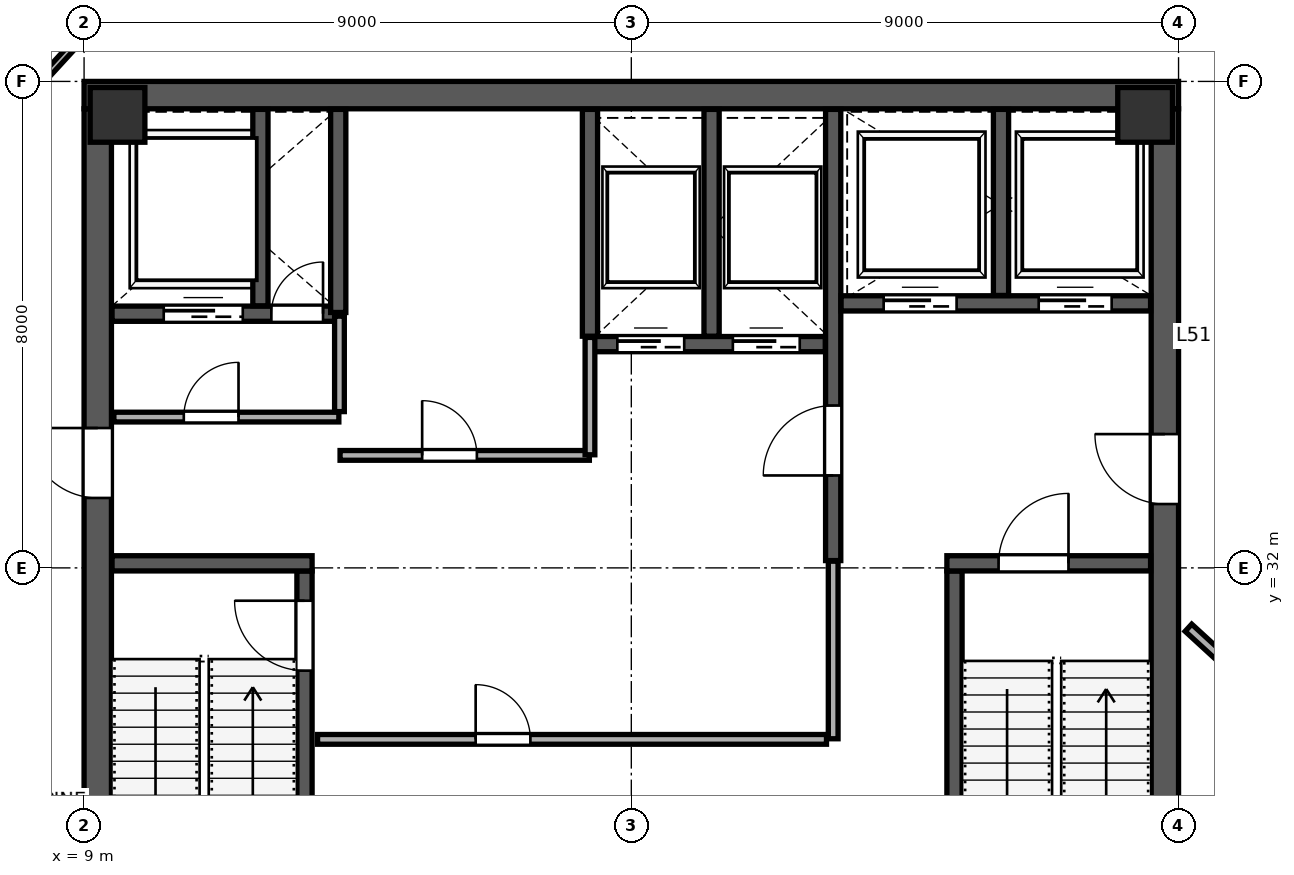
"""IFC4 building model, lengths in metres.
Left out: names, types, materials, properties, quantities, classifications, styles, units other than length and angle.
Written with IfcOpenShell. Run it as: python <this file> out.ifc"""

import sys

from ifc_helpers import new_model, si_unit, direction, frame, frame_2d, origin, origin_2d, place, context, subcontext, project, spatial, rectangle, extrude, source, transform, mapped, element, fill, save


model = new_model("IFC4")
c1 = context("Model", 3, precision=1e-05, world=origin(), true_north=direction((0.0, 1.0)))
c2 = subcontext(c1, "Body", "Model", "MODEL_VIEW")
j1 = project(units=[si_unit("LENGTHUNIT", "METRE"), si_unit("PLANEANGLEUNIT", "RADIAN")], contexts=[c1])
p1 = place(None, origin())
s1 = spatial("IfcSite", under=j1, at=p1, CompositionType="ELEMENT")
p2 = place(p1, origin())
s2 = spatial("IfcBuilding", under=s1, at=p2, CompositionType="ELEMENT")
p3 = place(p2, frame((0.0, 0.0, 229.0)))
s3 = spatial("IfcBuildingStorey", under=s2, at=p3, CompositionType="ELEMENT", Elevation=229.0)
m1 = source(origin(), c2, "Body", "SweptSolid", [
    extrude(rectangle(XDim=0.9, YDim=0.9, at=origin_2d()), origin(), (0.0, 0.0, 1.0), 4.198),
])
for number, where, z_axis, x_axis in (
    (1, (9.55, 39.45, 0.001), (0.0, 0.0, 1.0), (1.0, 0.0, 0.0)),
    (2, (26.45, 39.45, 0.001), (0.0, 0.0, 1.0), (1.0, 0.0, 0.0)),
):
    element("IfcColumn", number, at=place(p3, frame(where, z_axis=z_axis, x_axis=x_axis)), inside=s3, PredefinedType="COLUMN", context=c2, shape_type="MappedRepresentation", body=[
        mapped(m1, transform((0.0, 0.0, 0.0), scale=1.0)),
    ])
p4 = place(p3, frame((9.225, 24.45, 0.0), z_axis=(0.0, 0.0, 1.0), x_axis=(0.0, 1.0, 0.0)))
e3 = element("IfcWall", 3, at=p4, inside=s3, PredefinedType="SHEAR", context=c2, shape_type="SweptSolid", body=[
    extrude(rectangle(XDim=15.1, YDim=0.45, at=frame_2d((7.55, 0.0))), origin(), (0.0, 0.0, 1.0), 3.96),
])
p5 = place(p4, frame((8.7, 0.0, 0.0)))
e4 = element("IfcOpeningElement", 4, at=p5, cuts=e3, PredefinedType="OPENING", context=c2, shape_type="SweptSolid", body=[
    extrude(rectangle(XDim=1.15, YDim=2.2, at=frame_2d((0.575, 1.1))), frame((0.0, 0.235, 0.0), z_axis=(0.0, -1.0, 0.0), x_axis=(1.0, 0.0, 0.0)), (0.0, 0.0, 1.0), 0.47),
])
p6 = place(p3, frame((26.775, 24.45, 0.0), z_axis=(0.0, 0.0, 1.0), x_axis=(0.0, 1.0, 0.0)))
e5 = element("IfcWall", 5, at=p6, inside=s3, PredefinedType="SHEAR", context=c2, shape_type="SweptSolid", body=[
    extrude(rectangle(XDim=15.1, YDim=0.45, at=frame_2d((7.55, 0.0))), origin(), (0.0, 0.0, 1.0), 3.96),
])
p7 = place(p6, frame((8.6, 0.0, 0.0)))
e6 = element("IfcOpeningElement", 6, at=p7, cuts=e5, PredefinedType="OPENING", context=c2, shape_type="SweptSolid", body=[
    extrude(rectangle(XDim=1.15, YDim=2.2, at=frame_2d((0.575, 1.1))), frame((0.0, 0.235, 0.0), z_axis=(0.0, -1.0, 0.0), x_axis=(1.0, 0.0, 0.0)), (0.0, 0.0, 1.0), 0.47),
])
p8 = place(p3, frame((9.0, 39.775, 0.0), z_axis=(0.0, 0.0, 1.0), x_axis=(1.0, 0.0, 0.0)))
e7 = element("IfcWall", 7, at=p8, inside=s3, PredefinedType="SHEAR", context=c2, shape_type="SweptSolid", body=[
    extrude(rectangle(XDim=18.0, YDim=0.45, at=frame_2d((9.0, 0.0))), origin(), (0.0, 0.0, 1.0), 3.96),
])
p9 = place(p3, frame((12.625, 24.46, 0.0), z_axis=(0.0, 0.0, 1.0), x_axis=(0.0, 1.0, 0.0)))
e8 = element("IfcWall", 8, at=p9, inside=s3, PredefinedType="SHEAR", context=c2, shape_type="SweptSolid", body=[
    extrude(rectangle(XDim=7.49, YDim=0.25, at=frame_2d((3.745, 0.0))), origin(), (0.0, 0.0, 1.0), 3.96),
])
p10 = place(p9, frame((5.85, 0.0, 0.0)))
e9 = element("IfcOpeningElement", 9, at=p10, cuts=e8, PredefinedType="OPENING", context=c2, shape_type="SweptSolid", body=[
    extrude(rectangle(XDim=1.15, YDim=2.2, at=frame_2d((0.575, 1.1))), frame((0.0, 0.135, 0.0), z_axis=(0.0, -1.0, 0.0), x_axis=(1.0, 0.0, 0.0)), (0.0, 0.0, 1.0), 0.27),
])
p11 = place(p3, frame((9.46, 32.075, 0.0), z_axis=(0.0, 0.0, 1.0), x_axis=(1.0, 0.0, 0.0)))
e10 = element("IfcWall", 10, at=p11, inside=s3, PredefinedType="SHEAR", context=c2, shape_type="SweptSolid", body=[
    extrude(rectangle(XDim=3.29, YDim=0.25, at=frame_2d((1.645, 0.0))), origin(), (0.0, 0.0, 1.0), 3.96),
])
p12 = place(p3, frame((23.315, 24.46, 0.0), z_axis=(0.0, 0.0, 1.0), x_axis=(0.0, 1.0, 0.0)))
e11 = element("IfcWall", 11, at=p12, inside=s3, PredefinedType="SHEAR", context=c2, shape_type="SweptSolid", body=[
    extrude(rectangle(XDim=7.49, YDim=0.25, at=frame_2d((3.745, 0.0))), origin(), (0.0, 0.0, 1.0), 3.96),
])
p13 = place(p3, frame((23.19, 32.075, 0.0), z_axis=(0.0, 0.0, 1.0), x_axis=(1.0, 0.0, 0.0)))
e12 = element("IfcWall", 12, at=p13, inside=s3, PredefinedType="SHEAR", context=c2, shape_type="SweptSolid", body=[
    extrude(rectangle(XDim=3.35, YDim=0.25, at=frame_2d((1.675, 0.0))), origin(), (0.0, 0.0, 1.0), 3.96),
])
p14 = place(p13, frame((0.85, 0.0, 0.0)))
e13 = element("IfcOpeningElement", 13, at=p14, cuts=e12, PredefinedType="OPENING", context=c2, shape_type="SweptSolid", body=[
    extrude(rectangle(XDim=1.15, YDim=2.2, at=frame_2d((0.575, 1.1))), frame((0.0, 0.135, 0.0), z_axis=(0.0, -1.0, 0.0), x_axis=(1.0, 0.0, 0.0)), (0.0, 0.0, 1.0), 0.27),
])
p15 = place(p3, frame((21.32, 32.12, 0.0), z_axis=(0.0, 0.0, 1.0), x_axis=(0.0, 1.0, 0.0)))
e14 = element("IfcWall", 14, at=p15, inside=s3, PredefinedType="SHEAR", context=c2, shape_type="SweptSolid", body=[
    extrude(rectangle(XDim=7.42, YDim=0.25, at=frame_2d((3.71, 0.0))), origin(), (0.0, 0.0, 1.0), 3.96),
])
p16 = place(p15, frame((1.4, 0.0, 0.0)))
e15 = element("IfcOpeningElement", 15, at=p16, cuts=e14, PredefinedType="OPENING", context=c2, shape_type="SweptSolid", body=[
    extrude(rectangle(XDim=1.15, YDim=2.2, at=frame_2d((0.575, 1.1))), frame((0.0, 0.135, 0.0), z_axis=(0.0, -1.0, 0.0), x_axis=(1.0, 0.0, 0.0)), (0.0, 0.0, 1.0), 0.27),
])
p17 = place(p3, frame((9.46, 36.18, 0.0), z_axis=(0.0, 0.0, 1.0), x_axis=(1.0, 0.0, 0.0)))
e16 = element("IfcWall", 16, at=p17, inside=s3, PredefinedType="SHEAR", context=c2, shape_type="SweptSolid", body=[
    extrude(rectangle(XDim=3.79, YDim=0.25, at=frame_2d((1.895, 0.0))), origin(), (0.0, 0.0, 1.0), 3.96),
])
p18 = place(p17, frame((2.62, 0.0, 0.0)))
e17 = element("IfcOpeningElement", 17, at=p18, cuts=e16, PredefinedType="OPENING", context=c2, shape_type="SweptSolid", body=[
    extrude(rectangle(XDim=0.85, YDim=2.1, at=frame_2d((0.425, 1.05))), frame((0.0, 0.135, 0.0), z_axis=(0.0, -1.0, 0.0), x_axis=(1.0, 0.0, 0.0)), (0.0, 0.0, 1.0), 0.27),
])
p19 = place(p17, frame((0.85, 0.0, 0.0)))
e18 = element("IfcOpeningElement", 18, at=p19, cuts=e16, PredefinedType="OPENING", context=c2, shape_type="SweptSolid", body=[
    extrude(rectangle(XDim=1.3, YDim=2.25, at=frame_2d((0.65, 1.125))), frame((0.0, 0.135, 0.0), z_axis=(0.0, -1.0, 0.0), x_axis=(1.0, 0.0, 0.0)), (0.0, 0.0, 1.0), 0.27),
])
p20 = place(p3, frame((11.9, 36.31, 0.0), z_axis=(0.0, 0.0, 1.0), x_axis=(0.0, 1.0, 0.0)))
e19 = element("IfcWall", 19, at=p20, inside=s3, PredefinedType="SHEAR", context=c2, shape_type="SweptSolid", body=[
    extrude(rectangle(XDim=3.23, YDim=0.25, at=frame_2d((1.615, 0.0))), origin(), (0.0, 0.0, 1.0), 3.96),
])
p21 = place(p3, frame((21.45, 36.35, 0.0), z_axis=(0.0, 0.0, 1.0), x_axis=(1.0, 0.0, 0.0)))
e20 = element("IfcWall", 20, at=p21, inside=s3, PredefinedType="SHEAR", context=c2, shape_type="SweptSolid", body=[
    extrude(rectangle(XDim=5.09, YDim=0.25, at=frame_2d((2.545, 0.0))), origin(), (0.0, 0.0, 1.0), 3.96),
])
p22 = place(p21, frame((0.7, 0.0, 0.0)))
e21 = element("IfcOpeningElement", 21, at=p22, cuts=e20, PredefinedType="OPENING", context=c2, shape_type="SweptSolid", body=[
    extrude(rectangle(XDim=1.2, YDim=2.2, at=frame_2d((0.6, 1.1))), frame((0.0, 0.135, 0.0), z_axis=(0.0, -1.0, 0.0), x_axis=(1.0, 0.0, 0.0)), (0.0, 0.0, 1.0), 0.27),
])
p23 = place(p21, frame((3.25, 0.0, 0.0)))
e22 = element("IfcOpeningElement", 22, at=p23, cuts=e20, PredefinedType="OPENING", context=c2, shape_type="SweptSolid", body=[
    extrude(rectangle(XDim=1.2, YDim=2.2, at=frame_2d((0.6, 1.1))), frame((0.0, 0.135, 0.0), z_axis=(0.0, -1.0, 0.0), x_axis=(1.0, 0.0, 0.0)), (0.0, 0.0, 1.0), 0.27),
])
p24 = place(p3, frame((24.08, 36.48, 0.0), z_axis=(0.0, 0.0, 1.0), x_axis=(0.0, 1.0, 0.0)))
e23 = element("IfcWall", 23, at=p24, inside=s3, PredefinedType="SHEAR", context=c2, shape_type="SweptSolid", body=[
    extrude(rectangle(XDim=3.06, YDim=0.25, at=frame_2d((1.53, 0.0))), origin(), (0.0, 0.0, 1.0), 3.96),
])
p25 = place(p3, frame((13.18, 36.2, 0.0), z_axis=(0.0, 0.0, 1.0), x_axis=(0.0, 1.0, 0.0)))
e24 = element("IfcWall", 24, at=p25, inside=s3, PredefinedType="SHEAR", context=c2, shape_type="SweptSolid", body=[
    extrude(rectangle(XDim=3.34, YDim=0.25, at=frame_2d((1.67, 0.0))), origin(), (0.0, 0.0, 1.0), 3.96),
])
p26 = place(p3, frame((17.32, 35.68, 0.0), z_axis=(0.0, 0.0, 1.0), x_axis=(1.0, 0.0, 0.0)))
e25 = element("IfcWall", 25, at=p26, inside=s3, PredefinedType="SHEAR", context=c2, shape_type="SweptSolid", body=[
    extrude(rectangle(XDim=3.87, YDim=0.25, at=frame_2d((1.935, 0.0))), origin(), (0.0, 0.0, 1.0), 3.96),
])
p27 = place(p26, frame((0.45, 0.0, 0.0)))
e26 = element("IfcOpeningElement", 26, at=p27, cuts=e25, PredefinedType="OPENING", context=c2, shape_type="SweptSolid", body=[
    extrude(rectangle(XDim=1.1, YDim=2.2, at=frame_2d((0.55, 1.1))), frame((0.0, 0.135, 0.0), z_axis=(0.0, -1.0, 0.0), x_axis=(1.0, 0.0, 0.0)), (0.0, 0.0, 1.0), 0.27),
])
p28 = place(p26, frame((2.35, 0.0, 0.0)))
e27 = element("IfcOpeningElement", 27, at=p28, cuts=e25, PredefinedType="OPENING", context=c2, shape_type="SweptSolid", body=[
    extrude(rectangle(XDim=1.1, YDim=2.2, at=frame_2d((0.55, 1.1))), frame((0.0, 0.135, 0.0), z_axis=(0.0, -1.0, 0.0), x_axis=(1.0, 0.0, 0.0)), (0.0, 0.0, 1.0), 0.27),
])
for number, where, z_axis, x_axis in (
    (28, (17.32, 35.81, 0.0), (0.0, 0.0, 1.0), (0.0, 1.0, 0.0)),
    (29, (19.32, 35.81, 0.0), (0.0, 0.0, 1.0), (0.0, 1.0, 0.0)),
):
    element("IfcWall", number, at=place(p3, frame(where, z_axis=z_axis, x_axis=x_axis)), inside=s3, PredefinedType="SHEAR", context=c2, shape_type="SweptSolid", body=[
        extrude(rectangle(XDim=3.73, YDim=0.25, at=frame_2d((1.865, 0.0))), origin(), (0.0, 0.0, 1.0), 3.96),
    ])
p29 = place(p3, frame((9.49, 34.48, 0.0), z_axis=(0.0, 0.0, 1.0), x_axis=(1.0, 0.0, 0.0)))
e30 = element("IfcWall", 30, at=p29, inside=s3, PredefinedType="PARTITIONING", context=c2, shape_type="SweptSolid", body=[
    extrude(rectangle(XDim=3.7, YDim=0.16, at=frame_2d((1.85, 0.0))), origin(), (0.0, 0.0, 1.0), 3.96),
])
p30 = place(p29, frame((1.15, 0.0, 0.0)))
e31 = element("IfcOpeningElement", 31, at=p30, cuts=e30, PredefinedType="OPENING", context=c2, shape_type="SweptSolid", body=[
    extrude(rectangle(XDim=0.9, YDim=2.15, at=frame_2d((0.45, 1.075))), frame((0.0, 0.09, 0.0), z_axis=(0.0, -1.0, 0.0), x_axis=(1.0, 0.0, 0.0)), (0.0, 0.0, 1.0), 0.18),
])
p31 = place(p3, frame((13.2, 34.57, 0.0), z_axis=(0.0, 0.0, 1.0), x_axis=(0.0, 1.0, 0.0)))
e32 = element("IfcWall", 32, at=p31, inside=s3, PredefinedType="PARTITIONING", context=c2, shape_type="SweptSolid", body=[
    extrude(rectangle(XDim=1.57, YDim=0.16, at=frame_2d((0.785, 0.0))), origin(), (0.0, 0.0, 1.0), 3.96),
])
p32 = place(p3, frame((13.21, 33.85, 0.0), z_axis=(0.0, 0.0, 1.0), x_axis=(1.0, 0.0, 0.0)))
e33 = element("IfcWall", 33, at=p32, inside=s3, PredefinedType="PARTITIONING", context=c2, shape_type="SweptSolid", body=[
    extrude(rectangle(XDim=4.1, YDim=0.16, at=frame_2d((2.05, 0.0))), origin(), (0.0, 0.0, 1.0), 3.96),
])
p33 = place(p32, frame((1.35, 0.0, 0.0)))
e34 = element("IfcOpeningElement", 34, at=p33, cuts=e33, PredefinedType="OPENING", context=c2, shape_type="SweptSolid", body=[
    extrude(rectangle(XDim=0.9, YDim=2.15, at=frame_2d((0.45, 1.075))), frame((0.0, 0.09, 0.0), z_axis=(0.0, -1.0, 0.0), x_axis=(1.0, 0.0, 0.0)), (0.0, 0.0, 1.0), 0.18),
])
p34 = place(p3, frame((17.32, 33.86, 0.0), z_axis=(0.0, 0.0, 1.0), x_axis=(0.0, 1.0, 0.0)))
e35 = element("IfcWall", 35, at=p34, inside=s3, PredefinedType="PARTITIONING", context=c2, shape_type="SweptSolid", body=[
    extrude(rectangle(XDim=1.93, YDim=0.16, at=frame_2d((0.965, 0.0))), origin(), (0.0, 0.0, 1.0), 3.96),
])
p35 = place(p3, frame((12.84, 29.18, 0.0), z_axis=(0.0, 0.0, 1.0), x_axis=(1.0, 0.0, 0.0)))
e36 = element("IfcWall", 36, at=p35, inside=s3, PredefinedType="PARTITIONING", context=c2, shape_type="SweptSolid", body=[
    extrude(rectangle(XDim=8.37, YDim=0.16, at=frame_2d((4.185, 0.0))), origin(), (0.0, 0.0, 1.0), 3.96),
])
p36 = place(p35, frame((2.6, 0.0, 0.0)))
e37 = element("IfcOpeningElement", 37, at=p36, cuts=e36, PredefinedType="OPENING", context=c2, shape_type="SweptSolid", body=[
    extrude(rectangle(XDim=0.9, YDim=2.15, at=frame_2d((0.45, 1.075))), frame((0.0, 0.09, 0.0), z_axis=(0.0, -1.0, 0.0), x_axis=(1.0, 0.0, 0.0)), (0.0, 0.0, 1.0), 0.18),
])
p37 = place(p3, frame((21.32, 29.19, 0.0), z_axis=(0.0, 0.0, 1.0), x_axis=(0.0, 1.0, 0.0)))
e38 = element("IfcWall", 38, at=p37, inside=s3, PredefinedType="PARTITIONING", context=c2, shape_type="SweptSolid", body=[
    extrude(rectangle(XDim=2.92, YDim=0.16, at=frame_2d((1.46, 0.0))), origin(), (0.0, 0.0, 1.0), 3.96),
])
p38 = place(p3, frame((27.163, 31.016, 0.0), z_axis=(0.0, 0.0, 1.0), x_axis=(0.737296869908, -0.675568890361, 0.0)))
e39 = element("IfcWall", 39, at=p38, inside=s3, PredefinedType="PARTITIONING", context=c2, shape_type="SweptSolid", body=[
    extrude(rectangle(XDim=1.42, YDim=0.16, at=frame_2d((0.71, 0.0))), origin(), (0.0, 0.0, 1.0), 3.96),
])
p39 = place(p3, frame((17.504, 50.744, 0.0), z_axis=(0.0, 0.0, 1.0), x_axis=(0.737277850523, -0.675589646996, 0.0)))
e40 = element("IfcWall", 40, at=p39, inside=s3, PredefinedType="PARTITIONING", context=c2, shape_type="SweptSolid", body=[
    extrude(rectangle(XDim=21.87, YDim=0.1, at=frame_2d((10.935, 0.0))), origin(), (0.0, 0.0, 1.0), 3.96),
])
p40 = place(p39, frame((5.4, 0.0, 0.0)))
e41 = element("IfcOpeningElement", 41, at=p40, cuts=e40, PredefinedType="OPENING", context=c2, shape_type="SweptSolid", body=[
    extrude(rectangle(XDim=0.95, YDim=2.15, at=frame_2d((0.475, 1.075))), frame((0.0, 0.06, 0.0), z_axis=(0.0, -1.0, 0.0), x_axis=(1.0, 0.0, 0.0)), (0.0, 0.0, 1.0), 0.12),
])
p41 = place(p3, frame((1.73, 32.85, 0.0), z_axis=(0.0, 0.0, 1.0), x_axis=(0.675589845589, 0.737277668546, 0.0)))
e42 = element("IfcWall", 42, at=p41, inside=s3, PredefinedType="PARTITIONING", context=c2, shape_type="SweptSolid", body=[
    extrude(rectangle(XDim=26.742, YDim=0.115, at=frame_2d((13.371, 0.0))), origin(), (0.0, 0.0, 1.0), 3.96),
])
m2 = source(origin(), c2, "Body", "SweptSolid", [
    extrude(rectangle(XDim=1.15, YDim=2.2, at=frame_2d((0.575, 1.1))), frame((0.0, 0.025, 0.0), z_axis=(0.0, -1.0, 0.0), x_axis=(1.0, 0.0, 0.0)), (0.0, 0.0, 1.0), 0.05),
])
p42 = place(p10, origin())
e43 = element("IfcDoor", 43, at=p42, inside=s3, OperationType="SINGLE_SWING_RIGHT", PredefinedType="DOOR", context=c2, shape_type="MappedRepresentation", body=[
    mapped(m2, transform((0.0, 0.0, 0.0), scale=1.0)),
])
fill(e9, e43)
m3 = source(origin(), c2, "Body", "SweptSolid", [
    extrude(rectangle(XDim=1.15, YDim=2.2, at=frame_2d((0.575, 1.1))), frame((0.0, 0.025, 0.0), z_axis=(0.0, -1.0, 0.0), x_axis=(1.0, 0.0, 0.0)), (0.0, 0.0, 1.0), 0.05),
])
p43 = place(p16, origin())
e44 = element("IfcDoor", 44, at=p43, inside=s3, OperationType="SINGLE_SWING_LEFT", PredefinedType="DOOR", context=c2, shape_type="MappedRepresentation", body=[
    mapped(m3, transform((0.0, 0.0, 0.0), scale=1.0)),
])
fill(e15, e44)
p44 = place(p14, origin())
e45 = element("IfcDoor", 45, at=p44, inside=s3, OperationType="SINGLE_SWING_RIGHT", PredefinedType="DOOR", context=c2, shape_type="MappedRepresentation", body=[
    mapped(m2, transform((0.0, 0.0, 0.0), scale=1.0)),
])
fill(e13, e45)
p45 = place(p7, origin())
e46 = element("IfcDoor", 46, at=p45, inside=s3, OperationType="SINGLE_SWING_RIGHT", PredefinedType="DOOR", context=c2, shape_type="MappedRepresentation", body=[
    mapped(m3, transform((0.0, 0.0, 0.0), scale=1.0)),
])
fill(e6, e46)
p46 = place(p5, origin())
e47 = element("IfcDoor", 47, at=p46, inside=s3, OperationType="SINGLE_SWING_RIGHT", PredefinedType="DOOR", context=c2, shape_type="MappedRepresentation", body=[
    mapped(m3, transform((0.0, 0.0, 0.0), scale=1.0)),
])
fill(e4, e47)
m4 = source(origin(), c2, "Body", "SweptSolid", [
    extrude(rectangle(XDim=0.85, YDim=2.1, at=frame_2d((0.425, 1.05))), frame((0.0, 0.025, 0.0), z_axis=(0.0, -1.0, 0.0), x_axis=(1.0, 0.0, 0.0)), (0.0, 0.0, 1.0), 0.05),
])
p47 = place(p18, origin())
e48 = element("IfcDoor", 48, at=p47, inside=s3, OperationType="SINGLE_SWING_RIGHT", PredefinedType="DOOR", context=c2, shape_type="MappedRepresentation", body=[
    mapped(m4, transform((0.0, 0.0, 0.0), scale=1.0)),
])
fill(e17, e48)
m5 = source(origin(), c2, "Body", "SweptSolid", [
    extrude(rectangle(XDim=1.1, YDim=2.2, at=frame_2d((0.55, 1.1))), frame((0.0, 0.025, 0.0), z_axis=(0.0, -1.0, 0.0), x_axis=(1.0, 0.0, 0.0)), (0.0, 0.0, 1.0), 0.05),
])
p48 = place(p27, origin())
e49 = element("IfcDoor", 49, at=p48, inside=s3, OperationType="SLIDING_TO_LEFT", PredefinedType="DOOR", context=c2, shape_type="MappedRepresentation", body=[
    mapped(m5, transform((0.0, 0.0, 0.0), scale=1.0)),
])
fill(e26, e49)
p49 = place(p28, origin())
e50 = element("IfcDoor", 50, at=p49, inside=s3, OperationType="SLIDING_TO_RIGHT", PredefinedType="DOOR", context=c2, shape_type="MappedRepresentation", body=[
    mapped(m5, transform((0.0, 0.0, 0.0), scale=1.0)),
])
fill(e27, e50)
m6 = source(origin(), c2, "Body", "SweptSolid", [
    extrude(rectangle(XDim=1.2, YDim=2.2, at=frame_2d((0.6, 1.1))), frame((0.0, 0.025, 0.0), z_axis=(0.0, -1.0, 0.0), x_axis=(1.0, 0.0, 0.0)), (0.0, 0.0, 1.0), 0.05),
])
p50 = place(p22, origin())
e51 = element("IfcDoor", 51, at=p50, inside=s3, OperationType="SLIDING_TO_LEFT", PredefinedType="DOOR", context=c2, shape_type="MappedRepresentation", body=[
    mapped(m6, transform((0.0, 0.0, 0.0), scale=1.0)),
])
fill(e21, e51)
p51 = place(p23, origin())
e52 = element("IfcDoor", 52, at=p51, inside=s3, OperationType="SLIDING_TO_RIGHT", PredefinedType="DOOR", context=c2, shape_type="MappedRepresentation", body=[
    mapped(m6, transform((0.0, 0.0, 0.0), scale=1.0)),
])
fill(e22, e52)
m7 = source(origin(), c2, "Body", "SweptSolid", [
    extrude(rectangle(XDim=1.3, YDim=2.25, at=frame_2d((0.65, 1.125))), frame((0.0, 0.025, 0.0), z_axis=(0.0, -1.0, 0.0), x_axis=(1.0, 0.0, 0.0)), (0.0, 0.0, 1.0), 0.05),
])
p52 = place(p19, origin())
e53 = element("IfcDoor", 53, at=p52, inside=s3, OperationType="SLIDING_TO_LEFT", PredefinedType="DOOR", context=c2, shape_type="MappedRepresentation", body=[
    mapped(m7, transform((0.0, 0.0, 0.0), scale=1.0)),
])
fill(e18, e53)
m8 = source(origin(), c2, "Body", "SweptSolid", [
    extrude(rectangle(XDim=0.9, YDim=2.15, at=frame_2d((0.45, 1.075))), frame((0.0, 0.025, 0.0), z_axis=(0.0, -1.0, 0.0), x_axis=(1.0, 0.0, 0.0)), (0.0, 0.0, 1.0), 0.05),
])
p53 = place(p30, origin())
e54 = element("IfcDoor", 54, at=p53, inside=s3, OperationType="SINGLE_SWING_RIGHT", PredefinedType="DOOR", context=c2, shape_type="MappedRepresentation", body=[
    mapped(m8, transform((0.0, 0.0, 0.0), scale=1.0)),
])
fill(e31, e54)
p54 = place(p33, origin())
e55 = element("IfcDoor", 55, at=p54, inside=s3, OperationType="SINGLE_SWING_LEFT", PredefinedType="DOOR", context=c2, shape_type="MappedRepresentation", body=[
    mapped(m8, transform((0.0, 0.0, 0.0), scale=1.0)),
])
fill(e34, e55)
p55 = place(p36, origin())
e56 = element("IfcDoor", 56, at=p55, inside=s3, OperationType="SINGLE_SWING_LEFT", PredefinedType="DOOR", context=c2, shape_type="MappedRepresentation", body=[
    mapped(m8, transform((0.0, 0.0, 0.0), scale=1.0)),
])
fill(e37, e56)
save(model, sys.argv[1])
